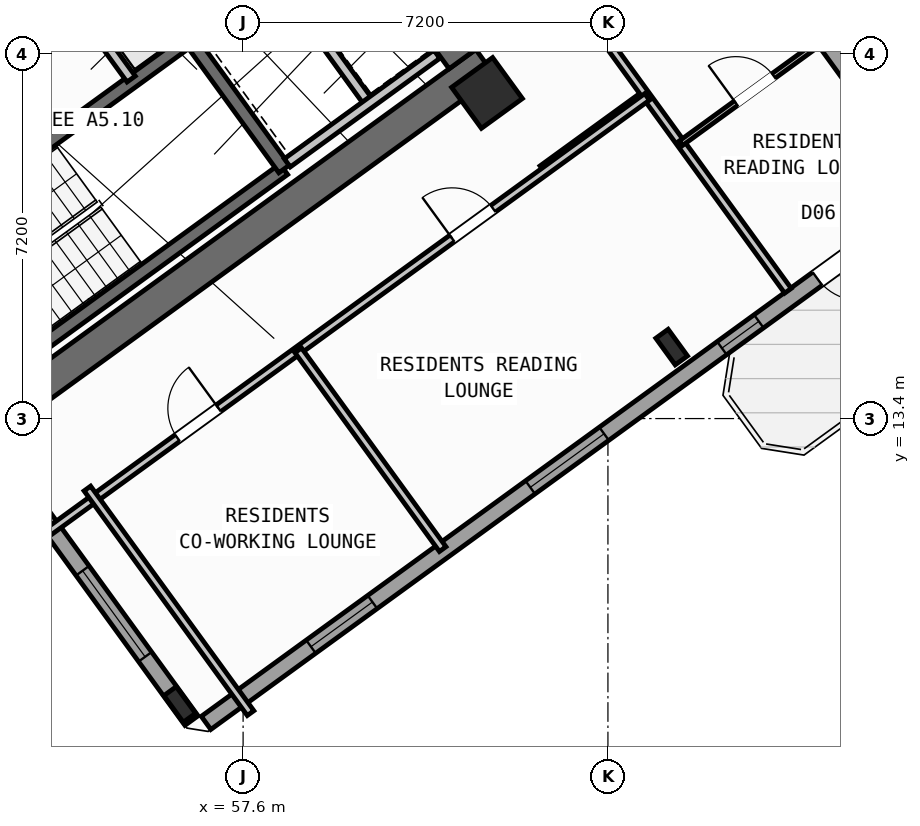
"""IFC4 building model, lengths in metres.
Left out: names, types, materials, properties, quantities, classifications, styles, units other than length and angle.
Written with IfcOpenShell. Run it as: python <this file> out.ifc"""

import sys

from ifc_helpers import new_model, si_unit, direction, frame, frame_2d, origin, origin_2d, place, context, subcontext, project, spatial, rectangle, hollow_rectangle, i_section, extrude, source, transform, mapped, element, fill, save


model = new_model("IFC4")
c1 = context("Model", 3, precision=1e-05, world=origin(), true_north=direction((0.0, 1.0)))
c2 = subcontext(c1, "Body", "Model", "MODEL_VIEW")
j1 = project(units=[si_unit("LENGTHUNIT", "METRE"), si_unit("PLANEANGLEUNIT", "RADIAN")], contexts=[c1])
p1 = place(None, origin())
s1 = spatial("IfcSite", under=j1, at=p1, CompositionType="ELEMENT")
p2 = place(p1, origin())
s2 = spatial("IfcBuilding", under=s1, at=p2, CompositionType="ELEMENT")
p3 = place(p2, frame((0.0, 0.0, 60.0)))
s3 = spatial("IfcBuildingStorey", under=s2, at=p3, CompositionType="ELEMENT", Elevation=60.0)
p4 = place(p3, frame((52.318, 13.11, 0.0), z_axis=(0.0, 0.0, 1.0), x_axis=(0.809019445368, 0.587781878776, 0.0)))
e1 = element("IfcWall", 1, at=p4, inside=s3, PredefinedType="SHEAR", context=c2, shape_type="SweptSolid", body=[
    extrude(rectangle(XDim=12.44, YDim=0.65, at=frame_2d((6.22, 0.0))), origin(), (0.0, 0.0, 1.0), 3.35),
])
p5 = place(p3, frame((61.929, 20.494, 0.0), z_axis=(0.0, 0.0, 1.0), x_axis=(-0.58782982593, 0.808984607855, 0.0)))
e2 = element("IfcWall", 2, at=p5, inside=s3, PredefinedType="SHEAR", context=c2, shape_type="SweptSolid", body=[
    extrude(rectangle(XDim=3.525, YDim=0.65, at=frame_2d((1.762, 0.0))), origin(), (0.0, 0.0, 1.0), 3.35),
])
m1 = source(origin(), c2, "Body", "SweptSolid", [
    extrude(i_section(OverallWidth=0.3, OverallDepth=0.65, WebThickness=0.016, FlangeThickness=0.031, at=origin_2d()), origin(), (0.0, 0.0, 1.0), 3.6),
])
for number, where, z_axis, x_axis in (
    (3, (56.35, 7.758, 0.0), (0.0, 0.0, 1.0), (0.809, 0.588, 0.0)),
    (4, (66.058, 14.811, 0.0), (0.0, 0.0, 1.0), (0.809, 0.588, 0.0)),
):
    element("IfcColumn", number, at=place(p3, frame(where, z_axis=z_axis, x_axis=x_axis)), inside=s3, PredefinedType="COLUMN", context=c2, shape_type="MappedRepresentation", body=[
        mapped(m1, transform((0.0, 0.0, 0.0), scale=1.0)),
    ])
m2 = source(origin(), c2, "Body", "SweptSolid", [
    extrude(hollow_rectangle(XDim=1.0, YDim=1.0, WallThickness=0.04, at=origin_2d()), origin(), (0.0, 0.0, 1.0), 3.6),
])
p6 = place(p3, frame((62.414, 19.827, 0.0), z_axis=(0.0, 0.0, 1.0), x_axis=(0.809016994375, 0.587785252292, 0.0)))
e5 = element("IfcColumn", 5, at=p6, inside=s3, PredefinedType="COLUMN", context=c2, shape_type="MappedRepresentation", body=[
    mapped(m2, transform((0.0, 0.0, 0.0), scale=1.0)),
])
p7 = place(p3, frame((58.455, 35.484, 0.0), z_axis=(0.0, 0.0, 1.0), x_axis=(0.587783625747, -0.809018176127, 0.0)))
e6 = element("IfcWall", 6, at=p7, inside=s3, PredefinedType="STANDARD", context=c2, shape_type="SweptSolid", body=[
    extrude(rectangle(XDim=21.587, YDim=0.32, at=frame_2d((10.794, 0.0))), origin(), (0.0, 0.0, 1.0), 2.725),
])
p8 = place(p7, frame((1.54, 0.0, 0.85)))
e7 = element("IfcOpeningElement", 7, at=p8, cuts=e6, PredefinedType="OPENING", context=c2, shape_type="SweptSolid", body=[
    extrude(rectangle(XDim=1.5, YDim=1.5, at=frame_2d((0.75, 0.75))), frame((0.0, 0.17, 0.0), z_axis=(0.0, -1.0, 0.0), x_axis=(1.0, 0.0, 0.0)), (0.0, 0.0, 1.0), 0.34),
])
p9 = place(p7, frame((4.695, 0.0, 0.85)))
e8 = element("IfcOpeningElement", 8, at=p9, cuts=e6, PredefinedType="OPENING", context=c2, shape_type="SweptSolid", body=[
    extrude(rectangle(XDim=1.8, YDim=1.5, at=frame_2d((0.9, 0.75))), frame((0.0, 0.17, 0.0), z_axis=(0.0, -1.0, 0.0), x_axis=(1.0, 0.0, 0.0)), (0.0, 0.0, 1.0), 0.34),
])
p10 = place(p7, frame((13.009, 0.0, 1.0)))
e9 = element("IfcOpeningElement", 9, at=p10, cuts=e6, PredefinedType="OPENING", context=c2, shape_type="SweptSolid", body=[
    extrude(rectangle(XDim=0.9, YDim=1.25, at=frame_2d((0.45, 0.625))), frame((0.0, 0.17, 0.0), z_axis=(0.0, -1.0, 0.0), x_axis=(1.0, 0.0, 0.0)), (0.0, 0.0, 1.0), 0.34),
])
p11 = place(p7, frame((16.092, 0.0, 0.95)))
e10 = element("IfcOpeningElement", 10, at=p11, cuts=e6, PredefinedType="OPENING", context=c2, shape_type="SweptSolid", body=[
    extrude(rectangle(XDim=1.2, YDim=1.4, at=frame_2d((0.6, 0.7))), frame((0.0, 0.17, 0.0), z_axis=(0.0, -1.0, 0.0), x_axis=(1.0, 0.0, 0.0)), (0.0, 0.0, 1.0), 0.34),
])
p12 = place(p7, frame((19.085, 0.0, 1.0)))
e11 = element("IfcOpeningElement", 11, at=p12, cuts=e6, PredefinedType="OPENING", context=c2, shape_type="SweptSolid", body=[
    extrude(rectangle(XDim=0.9, YDim=1.25, at=frame_2d((0.45, 0.625))), frame((0.0, 0.17, 0.0), z_axis=(0.0, -1.0, 0.0), x_axis=(1.0, 0.0, 0.0)), (0.0, 0.0, 1.0), 0.34),
])
p13 = place(p3, frame((71.098, 17.731, 0.0), z_axis=(0.0, 0.0, 1.0), x_axis=(-0.809021120468, -0.587779573171, 0.0)))
e12 = element("IfcWall", 12, at=p13, inside=s3, PredefinedType="STANDARD", context=c2, shape_type="SweptSolid", body=[
    extrude(rectangle(XDim=17.588, YDim=0.32, at=frame_2d((8.794, 0.0))), origin(), (0.0, 0.0, 1.0), 3.35),
])
p14 = place(p13, frame((1.624, 0.0, 0.0)))
e13 = element("IfcOpeningElement", 13, at=p14, cuts=e12, PredefinedType="OPENING", context=c2, shape_type="SweptSolid", body=[
    extrude(rectangle(XDim=1.05, YDim=2.15, at=frame_2d((0.525, 1.075))), frame((0.0, 0.17, 0.0), z_axis=(0.0, -1.0, 0.0), x_axis=(1.0, 0.0, 0.0)), (0.0, 0.0, 1.0), 0.34),
])
p15 = place(p13, frame((4.104, 0.0, 1.0)))
e14 = element("IfcOpeningElement", 14, at=p15, cuts=e12, PredefinedType="OPENING", context=c2, shape_type="SweptSolid", body=[
    extrude(rectangle(XDim=0.9, YDim=1.25, at=frame_2d((0.45, 0.625))), frame((0.0, 0.17, 0.0), z_axis=(0.0, -1.0, 0.0), x_axis=(1.0, 0.0, 0.0)), (0.0, 0.0, 1.0), 0.34),
])
p16 = place(p13, frame((7.879, 0.0, 0.85)))
e15 = element("IfcOpeningElement", 15, at=p16, cuts=e12, PredefinedType="OPENING", context=c2, shape_type="SweptSolid", body=[
    extrude(rectangle(XDim=1.8, YDim=1.5, at=frame_2d((0.9, 0.75))), frame((0.0, 0.17, 0.0), z_axis=(0.0, -1.0, 0.0), x_axis=(1.0, 0.0, 0.0)), (0.0, 0.0, 1.0), 0.34),
])
p17 = place(p13, frame((13.529, 0.0, 0.85)))
e16 = element("IfcOpeningElement", 16, at=p17, cuts=e12, PredefinedType="OPENING", context=c2, shape_type="SweptSolid", body=[
    extrude(rectangle(XDim=1.5, YDim=1.5, at=frame_2d((0.75, 0.75))), frame((0.0, 0.17, 0.0), z_axis=(0.0, -1.0, 0.0), x_axis=(1.0, 0.0, 0.0)), (0.0, 0.0, 1.0), 0.34),
])
p18 = place(p3, frame((56.581, 7.439, 0.0), z_axis=(0.0, 0.0, 1.0), x_axis=(-0.587785875463, 0.809016541614, 0.0)))
e17 = element("IfcWall", 17, at=p18, inside=s3, PredefinedType="STANDARD", context=c2, shape_type="SweptSolid", body=[
    extrude(rectangle(XDim=6.774, YDim=0.32, at=frame_2d((3.387, 0.0))), origin(), (0.0, 0.0, 1.0), 2.725),
])
p19 = place(p18, frame((1.556, 0.0, 0.8)))
e18 = element("IfcOpeningElement", 18, at=p19, cuts=e17, PredefinedType="OPENING", context=c2, shape_type="SweptSolid", body=[
    extrude(rectangle(XDim=2.1, YDim=1.55, at=frame_2d((1.05, 0.775))), frame((0.0, 0.17, 0.0), z_axis=(0.0, -1.0, 0.0), x_axis=(1.0, 0.0, 0.0)), (0.0, 0.0, 1.0), 0.34),
])
p20 = place(p3, frame((52.472, 14.013, 0.0), z_axis=(0.0, 0.0, 1.0), x_axis=(0.809028366311, 0.587769599847, 0.0)))
e19 = element("IfcWall", 19, at=p20, inside=s3, PredefinedType="SHEAR", context=c2, shape_type="SweptSolid", body=[
    extrude(rectangle(XDim=7.33, YDim=0.26, at=frame_2d((3.665, 0.0))), origin(), (0.0, 0.0, 1.0), 3.35),
])
p21 = place(p3, frame((50.615, 16.57, 0.0), z_axis=(0.0, 0.0, 1.0), x_axis=(0.809028366311, 0.587769599847, 0.0)))
e20 = element("IfcWall", 20, at=p21, inside=s3, PredefinedType="SHEAR", context=c2, shape_type="SweptSolid", body=[
    extrude(rectangle(XDim=7.33, YDim=0.26, at=frame_2d((3.665, 0.0))), origin(), (0.0, 0.0, 1.0), 3.35),
])
p22 = place(p21, frame((0.22, 0.0, 0.0)))
e21 = element("IfcOpeningElement", 21, at=p22, cuts=e20, PredefinedType="OPENING", context=c2, shape_type="SweptSolid", body=[
    extrude(rectangle(XDim=1.1, YDim=2.1, at=frame_2d((0.55, 1.05))), frame((0.0, 0.14, 0.0), z_axis=(0.0, -1.0, 0.0), x_axis=(1.0, 0.0, 0.0)), (0.0, 0.0, 1.0), 0.28),
])
p23 = place(p3, frame((58.41, 18.327, 0.0), z_axis=(0.0, 0.0, 1.0), x_axis=(-0.58776738483, 0.809029975545, 0.0)))
e22 = element("IfcWall", 22, at=p23, inside=s3, PredefinedType="SHEAR", context=c2, shape_type="SweptSolid", body=[
    extrude(rectangle(XDim=3.16, YDim=0.26, at=frame_2d((1.58, 0.0))), origin(), (0.0, 0.0, 1.0), 3.35),
])
p24 = place(p3, frame((55.391, 20.102, 0.0), z_axis=(0.0, 0.0, 1.0), x_axis=(-0.58778447739, 0.809017557374, 0.0)))
e23 = element("IfcWall", 23, at=p24, inside=s3, PredefinedType="STANDARD", context=c2, shape_type="SweptSolid", body=[
    extrude(rectangle(XDim=1.65, YDim=0.2, at=frame_2d((0.825, 0.0))), origin(), (0.0, 0.0, 1.0), 3.34),
])
p25 = place(p3, frame((60.067, 19.655, 0.0), z_axis=(0.0, 0.0, 1.0), x_axis=(-0.587800520745, 0.809005900975, 0.0)))
e24 = element("IfcWall", 24, at=p25, inside=s3, PredefinedType="STANDARD", context=c2, shape_type="SweptSolid", body=[
    extrude(rectangle(XDim=2.66, YDim=0.2, at=frame_2d((1.33, 0.0))), origin(), (0.0, 0.0, 1.0), 3.34),
])
p26 = place(p3, frame((58.472, 18.447, 0.0), z_axis=(0.0, 0.0, 1.0), x_axis=(0.809022487728, 0.587777691266, 0.0)))
e25 = element("IfcWall", 25, at=p26, inside=s3, PredefinedType="STANDARD", context=c2, shape_type="SweptSolid", body=[
    extrude(rectangle(XDim=3.648, YDim=0.2, at=frame_2d((1.824, 0.0))), origin(), (0.0, 0.0, 1.0), 3.34),
])
p27 = place(p3, frame((63.507, 18.322, 0.0), z_axis=(0.0, 0.0, 1.0), x_axis=(0.809034604122, 0.587761013791, 0.0)))
e26 = element("IfcWall", 26, at=p27, inside=s3, PredefinedType="PARTITIONING", context=c2, shape_type="SweptSolid", body=[
    extrude(rectangle(XDim=2.51, YDim=0.16, at=frame_2d((1.255, 0.0))), origin(), (0.0, 0.0, 1.0), 3.34),
])
p28 = place(p3, frame((68.353, 15.922, 0.0), z_axis=(0.0, 0.0, 1.0), x_axis=(-0.587784007866, 0.809017898502, 0.0)))
e27 = element("IfcWall", 27, at=p28, inside=s3, PredefinedType="PARTITIONING", context=c2, shape_type="SweptSolid", body=[
    extrude(rectangle(XDim=9.4, YDim=0.16, at=frame_2d((4.7, 0.0))), origin(), (0.0, 0.0, 1.0), 3.34),
])
p29 = place(p3, frame((66.238, 18.833, 0.0), z_axis=(0.0, 0.0, 1.0), x_axis=(0.809013833588, 0.587789602718, 0.0)))
e28 = element("IfcWall", 28, at=p29, inside=s3, PredefinedType="PARTITIONING", context=c2, shape_type="SweptSolid", body=[
    extrude(rectangle(XDim=3.61, YDim=0.11, at=frame_2d((1.805, 0.0))), origin(), (0.0, 0.0, 1.0), 3.34),
])
p30 = place(p29, frame((1.345, 0.0, 0.0)))
e29 = element("IfcOpeningElement", 29, at=p30, cuts=e28, PredefinedType="OPENING", context=c2, shape_type="SweptSolid", body=[
    extrude(rectangle(XDim=0.92, YDim=2.08, at=frame_2d((0.46, 1.04))), frame((0.0, 0.065, 0.0), z_axis=(0.0, -1.0, 0.0), x_axis=(1.0, 0.0, 0.0)), (0.0, 0.0, 1.0), 0.13),
])
p31 = place(p3, frame((53.705, 11.126, 0.0), z_axis=(0.0, 0.0, 1.0), x_axis=(0.809014504436, 0.587788679384, 0.0)))
e30 = element("IfcWall", 30, at=p31, inside=s3, PredefinedType="PARTITIONING", context=c2, shape_type="SweptSolid", body=[
    extrude(rectangle(XDim=14.67, YDim=0.16, at=frame_2d((7.335, 0.0))), origin(), (0.0, 0.0, 1.0), 3.34),
])
p32 = place(p31, frame((3.215, 0.0, 0.0)))
e31 = element("IfcOpeningElement", 31, at=p32, cuts=e30, PredefinedType="OPENING", context=c2, shape_type="SweptSolid", body=[
    extrude(rectangle(XDim=1.0, YDim=2.1, at=frame_2d((0.5, 1.05))), frame((0.0, 0.09, 0.0), z_axis=(0.0, -1.0, 0.0), x_axis=(1.0, 0.0, 0.0)), (0.0, 0.0, 1.0), 0.18),
])
p33 = place(p31, frame((9.915, 0.0, 0.0)))
e32 = element("IfcOpeningElement", 32, at=p33, cuts=e30, PredefinedType="OPENING", context=c2, shape_type="SweptSolid", body=[
    extrude(rectangle(XDim=1.0, YDim=2.1, at=frame_2d((0.5, 1.05))), frame((0.0, 0.09, 0.0), z_axis=(0.0, -1.0, 0.0), x_axis=(1.0, 0.0, 0.0)), (0.0, 0.0, 1.0), 0.18),
])
p34 = place(p3, frame((57.747, 7.586, 0.0), z_axis=(0.0, 0.0, 1.0), x_axis=(-0.587784893399, 0.809017255126, 0.0)))
e33 = element("IfcWall", 33, at=p34, inside=s3, PredefinedType="PARTITIONING", context=c2, shape_type="SweptSolid", body=[
    extrude(rectangle(XDim=5.48, YDim=0.16, at=frame_2d((2.74, 0.0))), origin(), (0.0, 0.0, 1.0), 3.34),
])
p35 = place(p3, frame((61.539, 10.823, 0.0), z_axis=(0.0, 0.0, 1.0), x_axis=(-0.587785532001, 0.809016791155, 0.0)))
e34 = element("IfcWall", 34, at=p35, inside=s3, PredefinedType="PARTITIONING", context=c2, shape_type="SweptSolid", body=[
    extrude(rectangle(XDim=4.85, YDim=0.16, at=frame_2d((2.425, 0.0))), origin(), (0.0, 0.0, 1.0), 3.34),
])
m3 = source(origin(), c2, "Body", "SweptSolid", [
    extrude(rectangle(XDim=1.05, YDim=2.15, at=frame_2d((0.525, 1.075))), frame((0.0, 0.025, 0.0), z_axis=(0.0, -1.0, 0.0), x_axis=(1.0, 0.0, 0.0)), (0.0, 0.0, 1.0), 0.05),
])
p36 = place(p14, origin())
e35 = element("IfcDoor", 35, at=p36, inside=s3, OperationType="SINGLE_SWING_LEFT", PredefinedType="DOOR", context=c2, shape_type="MappedRepresentation", body=[
    mapped(m3, transform((0.0, 0.0, 0.0), scale=1.0)),
])
fill(e13, e35)
m4 = source(origin(), c2, "Body", "SweptSolid", [
    extrude(rectangle(XDim=0.9, YDim=1.25, at=frame_2d((0.45, 0.625))), frame((0.0, 0.03, 0.0), z_axis=(0.0, -1.0, 0.0), x_axis=(1.0, 0.0, 0.0)), (0.0, 0.0, 1.0), 0.06),
])
p37 = place(p15, origin())
e36 = element("IfcWindow", 36, at=p37, inside=s3, PartitioningType="SINGLE_PANEL", PredefinedType="WINDOW", context=c2, shape_type="MappedRepresentation", body=[
    mapped(m4, transform((0.0, 0.0, 0.0), scale=1.0)),
])
fill(e14, e36)
m5 = source(origin(), c2, "Body", "SweptSolid", [
    extrude(rectangle(XDim=1.8, YDim=1.5, at=frame_2d((0.9, 0.75))), frame((0.0, 0.03, 0.0), z_axis=(0.0, -1.0, 0.0), x_axis=(1.0, 0.0, 0.0)), (0.0, 0.0, 1.0), 0.06),
])
p38 = place(p16, origin())
e37 = element("IfcWindow", 37, at=p38, inside=s3, PartitioningType="SINGLE_PANEL", PredefinedType="WINDOW", context=c2, shape_type="MappedRepresentation", body=[
    mapped(m5, transform((0.0, 0.0, 0.0), scale=1.0)),
])
fill(e15, e37)
m6 = source(origin(), c2, "Body", "SweptSolid", [
    extrude(rectangle(XDim=1.5, YDim=1.5, at=frame_2d((0.75, 0.75))), frame((0.0, 0.03, 0.0), z_axis=(0.0, -1.0, 0.0), x_axis=(1.0, 0.0, 0.0)), (0.0, 0.0, 1.0), 0.06),
])
p39 = place(p17, origin())
e38 = element("IfcWindow", 38, at=p39, inside=s3, PartitioningType="SINGLE_PANEL", PredefinedType="WINDOW", context=c2, shape_type="MappedRepresentation", body=[
    mapped(m6, transform((0.0, 0.0, 0.0), scale=1.0)),
])
fill(e16, e38)
m7 = source(origin(), c2, "Body", "SweptSolid", [
    extrude(rectangle(XDim=2.1, YDim=1.55, at=frame_2d((1.05, 0.775))), frame((0.0, 0.03, 0.0), z_axis=(0.0, -1.0, 0.0), x_axis=(1.0, 0.0, 0.0)), (0.0, 0.0, 1.0), 0.06),
])
p40 = place(p19, origin())
e39 = element("IfcWindow", 39, at=p40, inside=s3, PartitioningType="SINGLE_PANEL", PredefinedType="WINDOW", context=c2, shape_type="MappedRepresentation", body=[
    mapped(m7, transform((0.0, 0.0, 0.0), scale=1.0)),
])
fill(e18, e39)
m8 = source(origin(), c2, "Body", "SweptSolid", [
    extrude(rectangle(XDim=0.92, YDim=2.08, at=frame_2d((0.46, 1.04))), frame((0.0, 0.025, 0.0), z_axis=(0.0, -1.0, 0.0), x_axis=(1.0, 0.0, 0.0)), (0.0, 0.0, 1.0), 0.05),
])
p41 = place(p30, origin())
e40 = element("IfcDoor", 40, at=p41, inside=s3, OperationType="SINGLE_SWING_LEFT", PredefinedType="DOOR", context=c2, shape_type="MappedRepresentation", body=[
    mapped(m8, transform((0.0, 0.0, 0.0), scale=1.0)),
])
fill(e29, e40)
m9 = source(origin(), c2, "Body", "SweptSolid", [
    extrude(rectangle(XDim=1.0, YDim=2.1, at=frame_2d((0.5, 1.05))), frame((0.0, 0.025, 0.0), z_axis=(0.0, -1.0, 0.0), x_axis=(1.0, 0.0, 0.0)), (0.0, 0.0, 1.0), 0.05),
])
p42 = place(p32, origin())
e41 = element("IfcDoor", 41, at=p42, inside=s3, OperationType="SINGLE_SWING_RIGHT", PredefinedType="DOOR", context=c2, shape_type="MappedRepresentation", body=[
    mapped(m9, transform((0.0, 0.0, 0.0), scale=1.0)),
])
fill(e31, e41)
p43 = place(p33, origin())
e42 = element("IfcDoor", 42, at=p43, inside=s3, OperationType="SINGLE_SWING_LEFT", PredefinedType="DOOR", context=c2, shape_type="MappedRepresentation", body=[
    mapped(m9, transform((0.0, 0.0, 0.0), scale=1.0)),
])
fill(e32, e42)
save(model, sys.argv[1])
